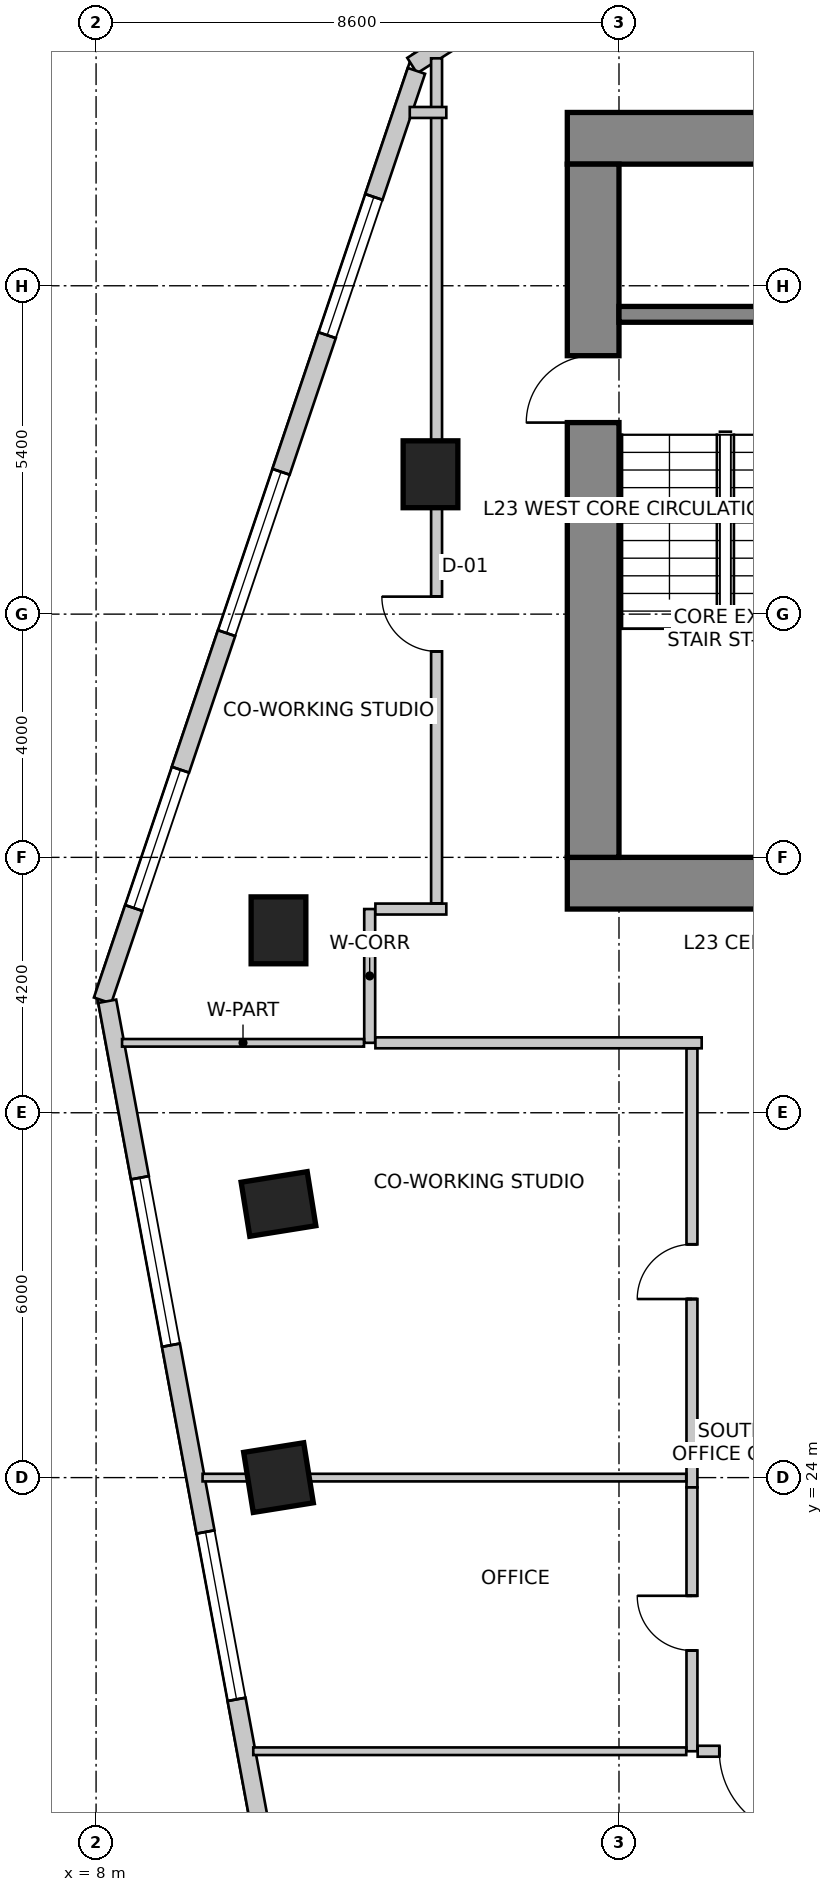
"""IFC4 building model, lengths in metres.
Left out: names, types, materials, properties, quantities, classifications, styles, units other than length and angle.
Written with IfcOpenShell. Run it as: python <this file> out.ifc"""

import sys

from ifc_helpers import new_model, si_unit, direction, frame, frame_2d, origin, origin_2d, place, context, subcontext, project, spatial, rectangle, extrude, source, transform, mapped, element, fill, save


model = new_model("IFC4")
c1 = context("Model", 3, precision=1e-05, world=origin(), true_north=direction((0.0, 1.0)))
c2 = subcontext(c1, "Body", "Model", "MODEL_VIEW")
j1 = project(units=[si_unit("LENGTHUNIT", "METRE"), si_unit("PLANEANGLEUNIT", "RADIAN")], contexts=[c1])
p1 = place(None, origin())
s1 = spatial("IfcSite", under=j1, at=p1, CompositionType="ELEMENT")
p2 = place(p1, origin())
s2 = spatial("IfcBuilding", under=s1, at=p2, CompositionType="ELEMENT")
p3 = place(p2, frame((0.0, 0.0, 95.0)))
s3 = spatial("IfcBuildingStorey", under=s2, at=p3, CompositionType="ELEMENT", Elevation=95.0)
p4 = place(p3, frame((15.75, 46.025, 0.0), z_axis=(0.0, 0.0, 1.0), x_axis=(1.0, 0.0, 0.0)))
e1 = element("IfcWall", 1, at=p4, inside=s3, PredefinedType="SHEAR", context=c2, shape_type="SweptSolid", body=[
    extrude(rectangle(XDim=16.1, YDim=0.85, at=frame_2d((8.05, 0.0))), origin(), (0.0, 0.0, 1.0), 4.0),
])
p5 = place(p3, frame((15.75, 33.775, 0.0), z_axis=(0.0, 0.0, 1.0), x_axis=(1.0, 0.0, 0.0)))
e2 = element("IfcWall", 2, at=p5, inside=s3, PredefinedType="SHEAR", context=c2, shape_type="SweptSolid", body=[
    extrude(rectangle(XDim=16.1, YDim=0.85, at=frame_2d((8.05, 0.0))), origin(), (0.0, 0.0, 1.0), 4.0),
])
m1 = source(origin(), c2, "Body", "SweptSolid", [
    extrude(rectangle(XDim=1.3, YDim=2.15, at=frame_2d((0.65, 1.075))), frame((0.0, 0.435, 0.0), z_axis=(0.0, -1.0, 0.0), x_axis=(1.0, 0.0, 0.0)), (0.0, 0.0, 1.0), 0.87),
])
p6 = place(p5, frame((10.18, 0.0, 0.0)))
e3 = element("IfcOpeningElement", 3, at=p6, cuts=e2, PredefinedType="OPENING", context=c2, shape_type="MappedRepresentation", body=[
    mapped(m1, transform((0.0, 0.0, 0.0), scale=1.0)),
])
p7 = place(p3, frame((16.175, 34.2, 0.0), z_axis=(0.0, 0.0, 1.0), x_axis=(0.0, 1.0, 0.0)))
e4 = element("IfcWall", 4, at=p7, inside=s3, PredefinedType="SHEAR", context=c2, shape_type="SweptSolid", body=[
    extrude(rectangle(XDim=11.4, YDim=0.85, at=frame_2d((5.7, 0.0))), origin(), (0.0, 0.0, 1.0), 4.0),
])
m2 = source(origin(), c2, "Body", "SweptSolid", [
    extrude(rectangle(XDim=1.1, YDim=2.15, at=frame_2d((0.55, 1.075))), frame((0.0, 0.435, 0.0), z_axis=(0.0, -1.0, 0.0), x_axis=(1.0, 0.0, 0.0)), (0.0, 0.0, 1.0), 0.87),
])
p8 = place(p7, frame((7.15, 0.0, 0.0)))
e5 = element("IfcOpeningElement", 5, at=p8, cuts=e4, PredefinedType="OPENING", context=c2, shape_type="MappedRepresentation", body=[
    mapped(m2, transform((0.0, 0.0, 0.0), scale=1.0)),
])
p9 = place(p3, frame((16.6, 43.13, 0.0), z_axis=(0.0, 0.0, 1.0), x_axis=(1.0, 0.0, 0.0)))
e6 = element("IfcWall", 6, at=p9, inside=s3, PredefinedType="SHEAR", context=c2, shape_type="SweptSolid", body=[
    extrude(rectangle(XDim=3.5, YDim=0.26, at=frame_2d((1.75, 0.0))), origin(), (0.0, 0.0, 1.0), 4.0),
])
m3 = source(origin(), c2, "Body", "SweptSolid", [
    extrude(rectangle(XDim=0.9, YDim=1.1, at=origin_2d()), origin(), (0.0, 0.0, 1.0), 4.0),
])
for number, where, z_axis, x_axis in (
    (7, (11.0, 33.0, 0.0), (0.0, 0.0, 1.0), (1.0, 0.0, 0.0)),
    (8, (13.5, 40.5, 0.0), (0.0, 0.0, 1.0), (1.0, 0.0, 0.0)),
    (9, (11.0, 28.5, 0.0), (0.0, 0.0, 1.0), (0.158, -0.987, 0.0)),
):
    element("IfcColumn", number, at=place(p3, frame(where, z_axis=z_axis, x_axis=x_axis)), inside=s3, PredefinedType="COLUMN", context=c2, shape_type="MappedRepresentation", body=[
        mapped(m3, transform((0.0, 0.0, 0.0), scale=1.0)),
    ])
m4 = source(origin(), c2, "Body", "SweptSolid", [
    extrude(rectangle(XDim=1.0, YDim=1.0, at=origin_2d()), origin(), (0.0, 0.0, 1.0), 4.0),
])
p10 = place(p3, frame((11.0, 24.0, 0.0), z_axis=(0.0, 0.0, 1.0), x_axis=(0.158158067254, -0.987413806751, 0.0)))
e10 = element("IfcColumn", 10, at=p10, inside=s3, PredefinedType="COLUMN", context=c2, shape_type="MappedRepresentation", body=[
    mapped(m4, transform((0.0, 0.0, 0.0), scale=1.0)),
])
p11 = place(p3, frame((21.875, 52.742, 0.0), z_axis=(0.0, 0.0, 1.0), x_axis=(-0.843662465249, -0.536873956092, 0.0)))
e11 = element("IfcWall", 11, at=p11, inside=s3, PredefinedType="SOLIDWALL", context=c2, shape_type="SweptSolid", body=[
    extrude(rectangle(XDim=10.284, YDim=0.3, at=frame_2d((5.142, 0.0))), origin(), (0.0, 0.0, 1.0), 3.7),
])
m5 = source(origin(), c2, "Body", "SweptSolid", [
    extrude(rectangle(XDim=1.2, YDim=1.6, at=frame_2d((0.6, 0.8))), frame((0.0, 0.16, 0.0), z_axis=(0.0, -1.0, 0.0), x_axis=(1.0, 0.0, 0.0)), (0.0, 0.0, 1.0), 0.32),
])
p12 = place(p11, frame((0.479, 0.0, 0.85)))
e12 = element("IfcOpeningElement", 12, at=p12, cuts=e11, PredefinedType="OPENING", context=c2, shape_type="MappedRepresentation", body=[
    mapped(m5, transform((0.0, 0.0, 0.0), scale=1.0)),
])
m6 = source(origin(), c2, "Body", "SweptSolid", [
    extrude(rectangle(XDim=2.8, YDim=2.4, at=frame_2d((1.4, 1.2))), frame((0.0, 0.16, 0.0), z_axis=(0.0, -1.0, 0.0), x_axis=(1.0, 0.0, 0.0)), (0.0, 0.0, 1.0), 0.32),
])
p13 = place(p11, frame((3.342, 0.0, 0.85)))
e13 = element("IfcOpeningElement", 13, at=p13, cuts=e11, PredefinedType="OPENING", context=c2, shape_type="MappedRepresentation", body=[
    mapped(m6, transform((0.0, 0.0, 0.0), scale=1.0)),
])
m7 = source(origin(), c2, "Body", "SweptSolid", [
    extrude(rectangle(XDim=1.8, YDim=2.1, at=frame_2d((0.9, 1.05))), frame((0.0, 0.16, 0.0), z_axis=(0.0, -1.0, 0.0), x_axis=(1.0, 0.0, 0.0)), (0.0, 0.0, 1.0), 0.32),
])
p14 = place(p11, frame((7.753, 0.0, 0.85)))
e14 = element("IfcOpeningElement", 14, at=p14, cuts=e11, PredefinedType="OPENING", context=c2, shape_type="MappedRepresentation", body=[
    mapped(m7, transform((0.0, 0.0, 0.0), scale=1.0)),
])
p15 = place(p3, frame((13.269, 47.134, 0.0), z_axis=(0.0, 0.0, 1.0), x_axis=(-0.319920423265, -0.947444416722, 0.0)))
e15 = element("IfcWall", 15, at=p15, inside=s3, PredefinedType="SOLIDWALL", context=c2, shape_type="SweptSolid", body=[
    extrude(rectangle(XDim=16.135, YDim=0.3, at=frame_2d((8.067, 0.0))), origin(), (0.0, 0.0, 1.0), 3.7),
])
m8 = source(origin(), c2, "Body", "SweptSolid", [
    extrude(rectangle(XDim=2.4, YDim=2.2, at=frame_2d((1.2, 1.1))), frame((0.0, 0.16, 0.0), z_axis=(0.0, -1.0, 0.0), x_axis=(1.0, 0.0, 0.0)), (0.0, 0.0, 1.0), 0.32),
])
p16 = place(p15, frame((2.188, 0.0, 0.85)))
e16 = element("IfcOpeningElement", 16, at=p16, cuts=e15, PredefinedType="OPENING", context=c2, shape_type="MappedRepresentation", body=[
    mapped(m8, transform((0.0, 0.0, 0.0), scale=1.0)),
])
p17 = place(p15, frame((6.959, 0.0, 0.85)))
e17 = element("IfcOpeningElement", 17, at=p17, cuts=e15, PredefinedType="OPENING", context=c2, shape_type="MappedRepresentation", body=[
    mapped(m6, transform((0.0, 0.0, 0.0), scale=1.0)),
])
p18 = place(p15, frame((12.13, 0.0, 0.85)))
e18 = element("IfcOpeningElement", 18, at=p18, cuts=e15, PredefinedType="OPENING", context=c2, shape_type="MappedRepresentation", body=[
    mapped(m8, transform((0.0, 0.0, 0.0), scale=1.0)),
])
p19 = place(p3, frame((8.183, 31.833, 0.0), z_axis=(0.0, 0.0, 1.0), x_axis=(0.18216364648, -0.983268226834, 0.0)))
e19 = element("IfcWall", 19, at=p19, inside=s3, PredefinedType="SOLIDWALL", context=c2, shape_type="SweptSolid", body=[
    extrude(rectangle(XDim=26.678, YDim=0.3, at=frame_2d((13.339, 0.0))), origin(), (0.0, 0.0, 1.0), 3.7),
])
p20 = place(p19, frame((2.952, 0.0, 0.85)))
e20 = element("IfcOpeningElement", 20, at=p20, cuts=e19, PredefinedType="OPENING", context=c2, shape_type="MappedRepresentation", body=[
    mapped(m6, transform((0.0, 0.0, 0.0), scale=1.0)),
])
p21 = place(p19, frame((8.876, 0.0, 0.85)))
e21 = element("IfcOpeningElement", 21, at=p21, cuts=e19, PredefinedType="OPENING", context=c2, shape_type="MappedRepresentation", body=[
    mapped(m6, transform((0.0, 0.0, 0.0), scale=1.0)),
])
p22 = place(p19, frame((13.647, 0.0, 0.85)))
e22 = element("IfcOpeningElement", 22, at=p22, cuts=e19, PredefinedType="OPENING", context=c2, shape_type="MappedRepresentation", body=[
    mapped(m6, transform((0.0, 0.0, 0.0), scale=1.0)),
])
p23 = place(p19, frame((18.372, 0.0, 0.85)))
e23 = element("IfcOpeningElement", 23, at=p23, cuts=e19, PredefinedType="OPENING", context=c2, shape_type="MappedRepresentation", body=[
    mapped(m8, transform((0.0, 0.0, 0.0), scale=1.0)),
])
p24 = place(p19, frame((22.696, 0.0, 0.85)))
e24 = element("IfcOpeningElement", 24, at=p24, cuts=e19, PredefinedType="OPENING", context=c2, shape_type="MappedRepresentation", body=[
    mapped(m6, transform((0.0, 0.0, 0.0), scale=1.0)),
])
p25 = place(p3, frame((12.5, 31.15, 0.0), z_axis=(0.0, 0.0, 1.0), x_axis=(0.0, 1.0, 0.0)))
e25 = element("IfcWall", 25, at=p25, inside=s3, PredefinedType="PARTITIONING", context=c2, shape_type="SweptSolid", body=[
    extrude(rectangle(XDim=2.2, YDim=0.18, at=frame_2d((1.1, 0.0))), origin(), (0.0, 0.0, 1.0), 3.384),
])
p26 = place(p3, frame((12.594, 33.35, 0.0), z_axis=(0.0, 0.0, 1.0), x_axis=(1.0, 0.0, 0.0)))
e26 = element("IfcWall", 26, at=p26, inside=s3, PredefinedType="PARTITIONING", context=c2, shape_type="SweptSolid", body=[
    extrude(rectangle(XDim=1.166, YDim=0.18, at=frame_2d((0.583, 0.0))), origin(), (0.0, 0.0, 1.0), 3.7),
])
p27 = place(p3, frame((17.96, 31.15, 0.0), z_axis=(0.0, 0.0, 1.0), x_axis=(-1.0, 0.0, 0.0)))
e27 = element("IfcWall", 27, at=p27, inside=s3, PredefinedType="PARTITIONING", context=c2, shape_type="SweptSolid", body=[
    extrude(rectangle(XDim=5.366, YDim=0.18, at=frame_2d((2.683, 0.0))), origin(), (0.0, 0.0, 1.0), 3.384),
])
p28 = place(p3, frame((13.6, 33.444, 0.0), z_axis=(0.0, 0.0, 1.0), x_axis=(0.0, 1.0, 0.0)))
e28 = element("IfcWall", 28, at=p28, inside=s3, PredefinedType="PARTITIONING", context=c2, shape_type="SweptSolid", body=[
    extrude(rectangle(XDim=13.896, YDim=0.18, at=frame_2d((6.948, 0.0))), origin(), (0.0, 0.0, 1.0), 2.842),
])
m9 = source(origin(), c2, "Body", "SweptSolid", [
    extrude(rectangle(XDim=0.9, YDim=2.15, at=frame_2d((0.45, 1.075))), frame((0.0, 0.1, 0.0), z_axis=(0.0, -1.0, 0.0), x_axis=(1.0, 0.0, 0.0)), (0.0, 0.0, 1.0), 0.2),
])
p29 = place(p28, frame((4.144, 0.0, 0.0)))
e29 = element("IfcOpeningElement", 29, at=p29, cuts=e28, PredefinedType="OPENING", context=c2, shape_type="MappedRepresentation", body=[
    mapped(m9, transform((0.0, 0.0, 0.0), scale=1.0)),
])
p30 = place(p3, frame((13.76, 46.45, 0.0), z_axis=(0.0, 0.0, 1.0), x_axis=(-1.0, 0.0, 0.0)))
e30 = element("IfcWall", 30, at=p30, inside=s3, PredefinedType="PARTITIONING", context=c2, shape_type="SweptSolid", body=[
    extrude(rectangle(XDim=0.601, YDim=0.18, at=frame_2d((0.301, 0.0))), origin(), (0.0, 0.0, 1.0), 3.7),
])
p31 = place(p3, frame((12.406, 31.15, 0.0), z_axis=(0.0, 0.0, 1.0), x_axis=(-1.0, 0.0, 0.0)))
e31 = element("IfcWall", 31, at=p31, inside=s3, PredefinedType="PARTITIONING", context=c2, shape_type="SweptSolid", body=[
    extrude(rectangle(XDim=3.979, YDim=0.125, at=frame_2d((1.99, 0.0))), origin(), (0.0, 0.0, 1.0), 2.842),
])
p32 = place(p3, frame((17.8, 23.84, 0.0), z_axis=(0.0, 0.0, 1.0), x_axis=(0.0, 1.0, 0.0)))
e32 = element("IfcWall", 32, at=p32, inside=s3, PredefinedType="PARTITIONING", context=c2, shape_type="SweptSolid", body=[
    extrude(rectangle(XDim=7.216, YDim=0.18, at=frame_2d((3.608, 0.0))), origin(), (0.0, 0.0, 1.0), 3.075),
])
p33 = place(p32, frame((3.097, 0.0, 0.0)))
e33 = element("IfcOpeningElement", 33, at=p33, cuts=e32, PredefinedType="OPENING", context=c2, shape_type="MappedRepresentation", body=[
    mapped(m9, transform((0.0, 0.0, 0.0), scale=1.0)),
])
p34 = place(p3, frame((17.8, 19.5, 0.0), z_axis=(0.0, 0.0, 1.0), x_axis=(0.0, 1.0, 0.0)))
e34 = element("IfcWall", 34, at=p34, inside=s3, PredefinedType="PARTITIONING", context=c2, shape_type="SweptSolid", body=[
    extrude(rectangle(XDim=4.338, YDim=0.18, at=frame_2d((2.169, 0.0))), origin(), (0.0, 0.0, 1.0), 3.272),
])
p35 = place(p34, frame((1.656, 0.0, 0.0)))
e35 = element("IfcOpeningElement", 35, at=p35, cuts=e34, PredefinedType="OPENING", context=c2, shape_type="MappedRepresentation", body=[
    mapped(m9, transform((0.0, 0.0, 0.0), scale=1.0)),
])
p36 = place(p3, frame((20.006, 19.5, 0.0), z_axis=(0.0, 0.0, 1.0), x_axis=(-1.0, 0.0, 0.0)))
e36 = element("IfcWall", 36, at=p36, inside=s3, PredefinedType="PARTITIONING", context=c2, shape_type="SweptSolid", body=[
    extrude(rectangle(XDim=2.112, YDim=0.18, at=frame_2d((1.056, 0.0))), origin(), (0.0, 0.0, 1.0), 3.7),
])
m10 = source(origin(), c2, "Body", "SweptSolid", [
    extrude(rectangle(XDim=1.4, YDim=2.15, at=frame_2d((0.7, 1.075))), frame((0.0, 0.1, 0.0), z_axis=(0.0, -1.0, 0.0), x_axis=(1.0, 0.0, 0.0)), (0.0, 0.0, 1.0), 0.2),
])
p37 = place(p36, frame((0.356, 0.0, 0.0)))
e37 = element("IfcOpeningElement", 37, at=p37, cuts=e36, PredefinedType="OPENING", context=c2, shape_type="MappedRepresentation", body=[
    mapped(m10, transform((0.0, 0.0, 0.0), scale=1.0)),
])
p38 = place(p3, frame((17.706, 24.0, 0.0), z_axis=(0.0, 0.0, 1.0), x_axis=(-1.0, 0.0, 0.0)))
e38 = element("IfcWall", 38, at=p38, inside=s3, PredefinedType="PARTITIONING", context=c2, shape_type="SweptSolid", body=[
    extrude(rectangle(XDim=7.954, YDim=0.125, at=frame_2d((3.977, 0.0))), origin(), (0.0, 0.0, 1.0), 2.842),
])
p39 = place(p3, frame((17.706, 19.5, 0.0), z_axis=(0.0, 0.0, 1.0), x_axis=(-1.0, 0.0, 0.0)))
e39 = element("IfcWall", 39, at=p39, inside=s3, PredefinedType="PARTITIONING", context=c2, shape_type="SweptSolid", body=[
    extrude(rectangle(XDim=7.121, YDim=0.125, at=frame_2d((3.561, 0.0))), origin(), (0.0, 0.0, 1.0), 3.7),
])
m11 = source(origin(), c2, "Body", "SweptSolid", [
    extrude(rectangle(XDim=2.4, YDim=2.2, at=frame_2d((1.2, 1.1))), frame((0.0, -0.015, 0.0), z_axis=(0.0, -1.0, 0.0), x_axis=(1.0, 0.0, 0.0)), (0.0, 0.0, 1.0), 0.06),
])
p40 = place(p16, origin())
e40 = element("IfcWindow", 40, at=p40, inside=s3, PartitioningType="SINGLE_PANEL", PredefinedType="WINDOW", context=c2, shape_type="MappedRepresentation", body=[
    mapped(m11, transform((0.0, 0.0, 0.0), scale=1.0)),
])
fill(e16, e40)
m12 = source(origin(), c2, "Body", "SweptSolid", [
    extrude(rectangle(XDim=2.8, YDim=2.4, at=frame_2d((1.4, 1.2))), frame((0.0, -0.015, 0.0), z_axis=(0.0, -1.0, 0.0), x_axis=(1.0, 0.0, 0.0)), (0.0, 0.0, 1.0), 0.06),
])
p41 = place(p17, origin())
e41 = element("IfcWindow", 41, at=p41, inside=s3, PartitioningType="SINGLE_PANEL", PredefinedType="WINDOW", context=c2, shape_type="MappedRepresentation", body=[
    mapped(m12, transform((0.0, 0.0, 0.0), scale=1.0)),
])
fill(e17, e41)
p42 = place(p18, origin())
e42 = element("IfcWindow", 42, at=p42, inside=s3, PartitioningType="SINGLE_PANEL", PredefinedType="WINDOW", context=c2, shape_type="MappedRepresentation", body=[
    mapped(m11, transform((0.0, 0.0, 0.0), scale=1.0)),
])
fill(e18, e42)
p43 = place(p20, origin())
e43 = element("IfcWindow", 43, at=p43, inside=s3, PartitioningType="SINGLE_PANEL", PredefinedType="WINDOW", context=c2, shape_type="MappedRepresentation", body=[
    mapped(m12, transform((0.0, 0.0, 0.0), scale=1.0)),
])
fill(e20, e43)
p44 = place(p21, origin())
e44 = element("IfcWindow", 44, at=p44, inside=s3, PartitioningType="SINGLE_PANEL", PredefinedType="WINDOW", context=c2, shape_type="MappedRepresentation", body=[
    mapped(m12, transform((0.0, 0.0, 0.0), scale=1.0)),
])
fill(e21, e44)
m13 = source(origin(), c2, "Body", "SweptSolid", [
    extrude(rectangle(XDim=1.1, YDim=2.15, at=frame_2d((0.55, 1.075))), frame((0.0, 0.025, 0.0), z_axis=(0.0, -1.0, 0.0), x_axis=(1.0, 0.0, 0.0)), (0.0, 0.0, 1.0), 0.05),
])
p45 = place(p8, origin())
e45 = element("IfcDoor", 45, at=p45, inside=s3, OperationType="SINGLE_SWING_LEFT", PredefinedType="DOOR", context=c2, shape_type="MappedRepresentation", body=[
    mapped(m13, transform((0.0, 0.0, 0.0), scale=1.0)),
])
fill(e5, e45)
m14 = source(origin(), c2, "Body", "SweptSolid", [
    extrude(rectangle(XDim=0.9, YDim=2.15, at=frame_2d((0.45, 1.075))), frame((0.0, 0.025, 0.0), z_axis=(0.0, -1.0, 0.0), x_axis=(1.0, 0.0, 0.0)), (0.0, 0.0, 1.0), 0.05),
])
p46 = place(p29, origin())
e46 = element("IfcDoor", 46, at=p46, inside=s3, OperationType="SINGLE_SWING_RIGHT", PredefinedType="DOOR", context=c2, shape_type="MappedRepresentation", body=[
    mapped(m14, transform((0.0, 0.0, 0.0), scale=1.0)),
])
fill(e29, e46)
p47 = place(p33, origin())
e47 = element("IfcDoor", 47, at=p47, inside=s3, OperationType="SINGLE_SWING_LEFT", PredefinedType="DOOR", context=c2, shape_type="MappedRepresentation", body=[
    mapped(m14, transform((0.0, 0.0, 0.0), scale=1.0)),
])
fill(e33, e47)
p48 = place(p35, origin())
e48 = element("IfcDoor", 48, at=p48, inside=s3, OperationType="SINGLE_SWING_RIGHT", PredefinedType="DOOR", context=c2, shape_type="MappedRepresentation", body=[
    mapped(m14, transform((0.0, 0.0, 0.0), scale=1.0)),
])
fill(e35, e48)
m15 = source(origin(), c2, "Body", "SweptSolid", [
    extrude(rectangle(XDim=1.4, YDim=2.15, at=frame_2d((0.7, 1.075))), frame((0.0, 0.025, 0.0), z_axis=(0.0, -1.0, 0.0), x_axis=(1.0, 0.0, 0.0)), (0.0, 0.0, 1.0), 0.05),
])
p49 = place(p37, origin())
e49 = element("IfcDoor", 49, at=p49, inside=s3, OperationType="SINGLE_SWING_LEFT", PredefinedType="DOOR", context=c2, shape_type="MappedRepresentation", body=[
    mapped(m15, transform((0.0, 0.0, 0.0), scale=1.0)),
])
fill(e37, e49)
save(model, sys.argv[1])
